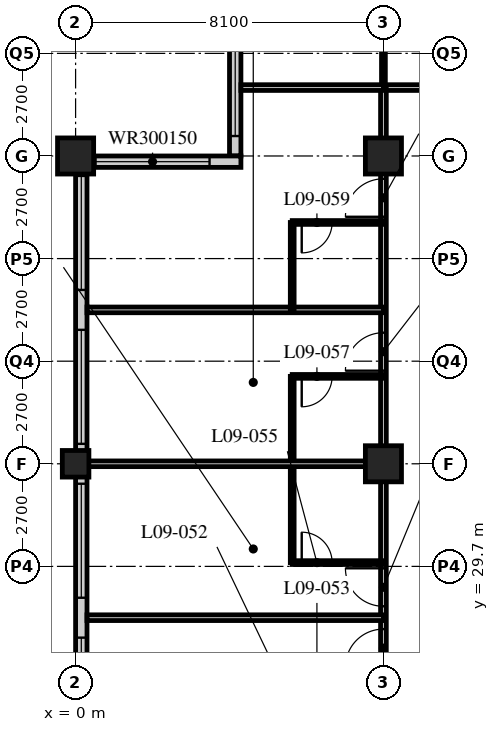
"""IFC4 building model, lengths in metres.
Left out: names, types, materials, properties, quantities, classifications, styles, units other than length and angle.
Written with IfcOpenShell. Run it as: python <this file> out.ifc"""

import sys

from ifc_helpers import new_model, si_unit, direction, frame, frame_2d, origin, origin_2d, place, context, subcontext, project, spatial, rectangle, hollow_rectangle, extrude, element, fill, save


model = new_model("IFC4")
c1 = context("Model", 3, precision=1e-05, world=origin(), true_north=direction((0.0, 1.0)))
c2 = subcontext(c1, "Body", "Model", "MODEL_VIEW")
j1 = project(units=[si_unit("LENGTHUNIT", "METRE"), si_unit("PLANEANGLEUNIT", "RADIAN")], contexts=[c1])
p1 = place(None, origin())
s1 = spatial("IfcSite", under=j1, at=p1, CompositionType="ELEMENT")
p2 = place(p1, origin())
s2 = spatial("IfcBuilding", under=s1, at=p2, CompositionType="ELEMENT")
p3 = place(p2, frame((0.0, 0.0, 43.2)))
s3 = spatial("IfcBuildingStorey", under=s2, at=p3, CompositionType="ELEMENT", Elevation=43.2)
p4 = place(p3, frame((0.0, 32.4, 0.0), z_axis=(0.0, 0.0, 1.0), x_axis=(1.0, 0.0, 0.0)))
e1 = element("IfcColumn", 1, at=p4, inside=s3, PredefinedType="COLUMN", context=c2, shape_type="SweptSolid", body=[
    extrude(hollow_rectangle(XDim=0.7, YDim=0.7, WallThickness=0.06, at=origin_2d()), origin(), (0.0, 0.0, 1.0), 3.4),
])
for number, where, z_axis, x_axis in (
    (2, (0.0, 40.5, 0.0), (0.0, 0.0, 1.0), (1.0, 0.0, 0.0)),
    (3, (8.1, 32.4, 0.0), (0.0, 0.0, 1.0), (1.0, 0.0, 0.0)),
    (4, (8.1, 40.5, 0.0), (0.0, 0.0, 1.0), (1.0, 0.0, 0.0)),
):
    element("IfcColumn", number, at=place(p3, frame(where, z_axis=z_axis, x_axis=x_axis)), inside=s3, PredefinedType="COLUMN", context=c2, shape_type="SweptSolid", body=[
        extrude(hollow_rectangle(XDim=0.95, YDim=0.95, WallThickness=0.095, at=origin_2d()), origin(), (0.0, 0.0, 1.0), 3.4),
    ])
p5 = place(p3, frame((4.2, 44.25, 0.0), z_axis=(0.0, 0.0, 1.0), x_axis=(0.0, -1.0, 0.0)))
e5 = element("IfcWall", 5, at=p5, inside=s3, PredefinedType="SOLIDWALL", context=c2, shape_type="SweptSolid", body=[
    extrude(rectangle(XDim=3.75, YDim=0.3, at=frame_2d((1.875, 0.0))), origin(), (0.0, 0.0, 1.0), 3.19),
])
p6 = place(p5, frame((0.225, 0.0, 0.9)))
e6 = element("IfcOpeningElement", 6, at=p6, cuts=e5, PredefinedType="OPENING", context=c2, shape_type="SweptSolid", body=[
    extrude(rectangle(XDim=3.0, YDim=1.5, at=frame_2d((1.5, 0.75))), frame((0.0, 0.16, 0.0), z_axis=(0.0, -1.0, 0.0), x_axis=(1.0, 0.0, 0.0)), (0.0, 0.0, 1.0), 0.32),
])
p7 = place(p3, frame((4.35, 40.35, 0.0), z_axis=(0.0, 0.0, 1.0), x_axis=(-1.0, 0.0, 0.0)))
e7 = element("IfcWall", 7, at=p7, inside=s3, PredefinedType="SOLIDWALL", context=c2, shape_type="SweptSolid", body=[
    extrude(rectangle(XDim=4.35, YDim=0.3, at=frame_2d((2.175, 0.0))), origin(), (0.0, 0.0, 1.0), 3.19),
])
p8 = place(p7, frame((0.825, 0.0, 0.9)))
e8 = element("IfcOpeningElement", 8, at=p8, cuts=e7, PredefinedType="OPENING", context=c2, shape_type="SweptSolid", body=[
    extrude(rectangle(XDim=3.0, YDim=1.5, at=frame_2d((1.5, 0.75))), frame((0.0, 0.16, 0.0), z_axis=(0.0, -1.0, 0.0), x_axis=(1.0, 0.0, 0.0)), (0.0, 0.0, 1.0), 0.32),
])
p9 = place(p3, frame((0.15, 40.2, 0.0), z_axis=(0.0, 0.0, 1.0), x_axis=(0.0, -1.0, 0.0)))
e9 = element("IfcWall", 9, at=p9, inside=s3, PredefinedType="SOLIDWALL", context=c2, shape_type="SweptSolid", body=[
    extrude(rectangle(XDim=32.1, YDim=0.3, at=frame_2d((16.05, 0.0))), origin(), (0.0, 0.0, 1.0), 3.19),
])
p10 = place(p9, frame((0.225, 0.0, 0.9)))
e10 = element("IfcOpeningElement", 10, at=p10, cuts=e9, PredefinedType="OPENING", context=c2, shape_type="SweptSolid", body=[
    extrude(rectangle(XDim=3.0, YDim=2.0, at=frame_2d((1.5, 1.0))), frame((0.0, 0.16, 0.0), z_axis=(0.0, -1.0, 0.0), x_axis=(1.0, 0.0, 0.0)), (0.0, 0.0, 1.0), 0.32),
])
p11 = place(p9, frame((4.275, 0.0, 0.9)))
e11 = element("IfcOpeningElement", 11, at=p11, cuts=e9, PredefinedType="OPENING", context=c2, shape_type="SweptSolid", body=[
    extrude(rectangle(XDim=3.0, YDim=2.0, at=frame_2d((1.5, 1.0))), frame((0.0, 0.16, 0.0), z_axis=(0.0, -1.0, 0.0), x_axis=(1.0, 0.0, 0.0)), (0.0, 0.0, 1.0), 0.32),
])
p12 = place(p9, frame((8.325, 0.0, 0.9)))
e12 = element("IfcOpeningElement", 12, at=p12, cuts=e9, PredefinedType="OPENING", context=c2, shape_type="SweptSolid", body=[
    extrude(rectangle(XDim=3.0, YDim=2.0, at=frame_2d((1.5, 1.0))), frame((0.0, 0.16, 0.0), z_axis=(0.0, -1.0, 0.0), x_axis=(1.0, 0.0, 0.0)), (0.0, 0.0, 1.0), 0.32),
])
p13 = place(p9, frame((12.375, 0.0, 0.9)))
e13 = element("IfcOpeningElement", 13, at=p13, cuts=e9, PredefinedType="OPENING", context=c2, shape_type="SweptSolid", body=[
    extrude(rectangle(XDim=3.0, YDim=2.0, at=frame_2d((1.5, 1.0))), frame((0.0, 0.16, 0.0), z_axis=(0.0, -1.0, 0.0), x_axis=(1.0, 0.0, 0.0)), (0.0, 0.0, 1.0), 0.32),
])
p14 = place(p9, frame((16.425, 0.0, 0.9)))
e14 = element("IfcOpeningElement", 14, at=p14, cuts=e9, PredefinedType="OPENING", context=c2, shape_type="SweptSolid", body=[
    extrude(rectangle(XDim=3.0, YDim=2.0, at=frame_2d((1.5, 1.0))), frame((0.0, 0.16, 0.0), z_axis=(0.0, -1.0, 0.0), x_axis=(1.0, 0.0, 0.0)), (0.0, 0.0, 1.0), 0.32),
])
p15 = place(p9, frame((20.475, 0.0, 0.9)))
e15 = element("IfcOpeningElement", 15, at=p15, cuts=e9, PredefinedType="OPENING", context=c2, shape_type="SweptSolid", body=[
    extrude(rectangle(XDim=3.0, YDim=2.0, at=frame_2d((1.5, 1.0))), frame((0.0, 0.16, 0.0), z_axis=(0.0, -1.0, 0.0), x_axis=(1.0, 0.0, 0.0)), (0.0, 0.0, 1.0), 0.32),
])
p16 = place(p9, frame((24.525, 0.0, 0.9)))
e16 = element("IfcOpeningElement", 16, at=p16, cuts=e9, PredefinedType="OPENING", context=c2, shape_type="SweptSolid", body=[
    extrude(rectangle(XDim=3.0, YDim=2.0, at=frame_2d((1.5, 1.0))), frame((0.0, 0.16, 0.0), z_axis=(0.0, -1.0, 0.0), x_axis=(1.0, 0.0, 0.0)), (0.0, 0.0, 1.0), 0.32),
])
p17 = place(p9, frame((28.575, 0.0, 0.9)))
e17 = element("IfcOpeningElement", 17, at=p17, cuts=e9, PredefinedType="OPENING", context=c2, shape_type="SweptSolid", body=[
    extrude(rectangle(XDim=3.0, YDim=2.0, at=frame_2d((1.5, 1.0))), frame((0.0, 0.16, 0.0), z_axis=(0.0, -1.0, 0.0), x_axis=(1.0, 0.0, 0.0)), (0.0, 0.0, 1.0), 0.32),
])
p18 = place(p3, frame((8.1, 42.3, 0.0), z_axis=(0.0, 0.0, 1.0), x_axis=(1.0, 0.0, 0.0)))
e18 = element("IfcWall", 18, at=p18, inside=s3, PredefinedType="PARTITIONING", context=c2, shape_type="SweptSolid", body=[
    extrude(rectangle(XDim=40.5, YDim=0.15, at=frame_2d((20.25, 0.0))), origin(), (0.0, 0.0, 1.0), 3.19),
])
p19 = place(p18, frame((6.5, 0.0, 0.0)))
e19 = element("IfcOpeningElement", 19, at=p19, cuts=e18, PredefinedType="OPENING", context=c2, shape_type="SweptSolid", body=[
    extrude(rectangle(XDim=1.0, YDim=2.1, at=frame_2d((0.5, 1.05))), frame((0.0, 0.085, 0.0), z_axis=(0.0, -1.0, 0.0), x_axis=(1.0, 0.0, 0.0)), (0.0, 0.0, 1.0), 0.17),
])
p20 = place(p18, frame((10.55, 0.0, 0.0)))
e20 = element("IfcOpeningElement", 20, at=p20, cuts=e18, PredefinedType="OPENING", context=c2, shape_type="SweptSolid", body=[
    extrude(rectangle(XDim=1.0, YDim=2.1, at=frame_2d((0.5, 1.05))), frame((0.0, 0.085, 0.0), z_axis=(0.0, -1.0, 0.0), x_axis=(1.0, 0.0, 0.0)), (0.0, 0.0, 1.0), 0.17),
])
p21 = place(p18, frame((14.6, 0.0, 0.0)))
e21 = element("IfcOpeningElement", 21, at=p21, cuts=e18, PredefinedType="OPENING", context=c2, shape_type="SweptSolid", body=[
    extrude(rectangle(XDim=1.0, YDim=2.1, at=frame_2d((0.5, 1.05))), frame((0.0, 0.085, 0.0), z_axis=(0.0, -1.0, 0.0), x_axis=(1.0, 0.0, 0.0)), (0.0, 0.0, 1.0), 0.17),
])
p22 = place(p18, frame((18.65, 0.0, 0.0)))
e22 = element("IfcOpeningElement", 22, at=p22, cuts=e18, PredefinedType="OPENING", context=c2, shape_type="SweptSolid", body=[
    extrude(rectangle(XDim=1.0, YDim=2.1, at=frame_2d((0.5, 1.05))), frame((0.0, 0.085, 0.0), z_axis=(0.0, -1.0, 0.0), x_axis=(1.0, 0.0, 0.0)), (0.0, 0.0, 1.0), 0.17),
])
p23 = place(p18, frame((22.7, 0.0, 0.0)))
e23 = element("IfcOpeningElement", 23, at=p23, cuts=e18, PredefinedType="OPENING", context=c2, shape_type="SweptSolid", body=[
    extrude(rectangle(XDim=1.0, YDim=2.1, at=frame_2d((0.5, 1.05))), frame((0.0, 0.085, 0.0), z_axis=(0.0, -1.0, 0.0), x_axis=(1.0, 0.0, 0.0)), (0.0, 0.0, 1.0), 0.17),
])
p24 = place(p18, frame((26.75, 0.0, 0.0)))
e24 = element("IfcOpeningElement", 24, at=p24, cuts=e18, PredefinedType="OPENING", context=c2, shape_type="SweptSolid", body=[
    extrude(rectangle(XDim=1.0, YDim=2.1, at=frame_2d((0.5, 1.05))), frame((0.0, 0.085, 0.0), z_axis=(0.0, -1.0, 0.0), x_axis=(1.0, 0.0, 0.0)), (0.0, 0.0, 1.0), 0.17),
])
p25 = place(p18, frame((30.8, 0.0, 0.0)))
e25 = element("IfcOpeningElement", 25, at=p25, cuts=e18, PredefinedType="OPENING", context=c2, shape_type="SweptSolid", body=[
    extrude(rectangle(XDim=1.0, YDim=2.1, at=frame_2d((0.5, 1.05))), frame((0.0, 0.085, 0.0), z_axis=(0.0, -1.0, 0.0), x_axis=(1.0, 0.0, 0.0)), (0.0, 0.0, 1.0), 0.17),
])
p26 = place(p18, frame((34.85, 0.0, 0.0)))
e26 = element("IfcOpeningElement", 26, at=p26, cuts=e18, PredefinedType="OPENING", context=c2, shape_type="SweptSolid", body=[
    extrude(rectangle(XDim=1.0, YDim=2.1, at=frame_2d((0.5, 1.05))), frame((0.0, 0.085, 0.0), z_axis=(0.0, -1.0, 0.0), x_axis=(1.0, 0.0, 0.0)), (0.0, 0.0, 1.0), 0.17),
])
p27 = place(p18, frame((36.875, 0.0, 0.0)))
e27 = element("IfcOpeningElement", 27, at=p27, cuts=e18, PredefinedType="OPENING", context=c2, shape_type="SweptSolid", body=[
    extrude(rectangle(XDim=1.0, YDim=2.1, at=frame_2d((0.5, 1.05))), frame((0.0, 0.085, 0.0), z_axis=(0.0, -1.0, 0.0), x_axis=(1.0, 0.0, 0.0)), (0.0, 0.0, 1.0), 0.17),
])
p28 = place(p18, frame((2.625, 0.0, 0.0)))
e28 = element("IfcOpeningElement", 28, at=p28, cuts=e18, PredefinedType="OPENING", context=c2, shape_type="SweptSolid", body=[
    extrude(rectangle(XDim=1.0, YDim=2.1, at=frame_2d((0.5, 1.05))), frame((0.0, 0.085, 0.0), z_axis=(0.0, -1.0, 0.0), x_axis=(1.0, 0.0, 0.0)), (0.0, 0.0, 1.0), 0.17),
])
p29 = place(p3, frame((8.1, 16.2, 0.0), z_axis=(0.0, 0.0, 1.0), x_axis=(0.0, 1.0, 0.0)))
e29 = element("IfcWall", 29, at=p29, inside=s3, PredefinedType="PARTITIONING", context=c2, shape_type="SweptSolid", body=[
    extrude(rectangle(XDim=26.1, YDim=0.15, at=frame_2d((13.05, 0.0))), origin(), (0.0, 0.0, 1.0), 2.578),
])
p30 = place(p29, frame((2.75, 0.0, 0.0)))
e30 = element("IfcOpeningElement", 30, at=p30, cuts=e29, PredefinedType="OPENING", context=c2, shape_type="SweptSolid", body=[
    extrude(rectangle(XDim=1.0, YDim=2.1, at=frame_2d((0.5, 1.05))), frame((0.0, 0.085, 0.0), z_axis=(0.0, -1.0, 0.0), x_axis=(1.0, 0.0, 0.0)), (0.0, 0.0, 1.0), 0.17),
])
p31 = place(p29, frame((4.35, 0.0, 0.0)))
e31 = element("IfcOpeningElement", 31, at=p31, cuts=e29, PredefinedType="OPENING", context=c2, shape_type="SweptSolid", body=[
    extrude(rectangle(XDim=1.0, YDim=2.1, at=frame_2d((0.5, 1.05))), frame((0.0, 0.085, 0.0), z_axis=(0.0, -1.0, 0.0), x_axis=(1.0, 0.0, 0.0)), (0.0, 0.0, 1.0), 0.17),
])
p32 = place(p29, frame((10.85, 0.0, 0.0)))
e32 = element("IfcOpeningElement", 32, at=p32, cuts=e29, PredefinedType="OPENING", context=c2, shape_type="SweptSolid", body=[
    extrude(rectangle(XDim=1.0, YDim=2.1, at=frame_2d((0.5, 1.05))), frame((0.0, 0.085, 0.0), z_axis=(0.0, -1.0, 0.0), x_axis=(1.0, 0.0, 0.0)), (0.0, 0.0, 1.0), 0.17),
])
p33 = place(p29, frame((12.45, 0.0, 0.0)))
e33 = element("IfcOpeningElement", 33, at=p33, cuts=e29, PredefinedType="OPENING", context=c2, shape_type="SweptSolid", body=[
    extrude(rectangle(XDim=1.0, YDim=2.1, at=frame_2d((0.5, 1.05))), frame((0.0, 0.085, 0.0), z_axis=(0.0, -1.0, 0.0), x_axis=(1.0, 0.0, 0.0)), (0.0, 0.0, 1.0), 0.17),
])
p34 = place(p29, frame((18.65, 0.0, 0.0)))
e34 = element("IfcOpeningElement", 34, at=p34, cuts=e29, PredefinedType="OPENING", context=c2, shape_type="SweptSolid", body=[
    extrude(rectangle(XDim=1.0, YDim=2.1, at=frame_2d((0.5, 1.05))), frame((0.0, 0.085, 0.0), z_axis=(0.0, -1.0, 0.0), x_axis=(1.0, 0.0, 0.0)), (0.0, 0.0, 1.0), 0.17),
])
p35 = place(p29, frame((22.7, 0.0, 0.0)))
e35 = element("IfcOpeningElement", 35, at=p35, cuts=e29, PredefinedType="OPENING", context=c2, shape_type="SweptSolid", body=[
    extrude(rectangle(XDim=1.0, YDim=2.1, at=frame_2d((0.5, 1.05))), frame((0.0, 0.085, 0.0), z_axis=(0.0, -1.0, 0.0), x_axis=(1.0, 0.0, 0.0)), (0.0, 0.0, 1.0), 0.17),
])
p36 = place(p3, frame((8.1, 28.35, 0.0), z_axis=(0.0, 0.0, 1.0), x_axis=(-1.0, 0.0, 0.0)))
e36 = element("IfcWall", 36, at=p36, inside=s3, PredefinedType="PARTITIONING", context=c2, shape_type="SweptSolid", body=[
    extrude(rectangle(XDim=7.8, YDim=0.15, at=frame_2d((3.9, 0.0))), origin(), (0.0, 0.0, 1.0), 3.19),
])
p37 = place(p3, frame((5.7, 29.8, 0.0), z_axis=(0.0, 0.0, 1.0), x_axis=(0.0, 1.0, 0.0)))
e37 = element("IfcWall", 37, at=p37, inside=s3, PredefinedType="PARTITIONING", context=c2, shape_type="SweptSolid", body=[
    extrude(rectangle(XDim=4.9, YDim=0.1, at=frame_2d((2.45, 0.0))), origin(), (0.0, 0.0, 1.0), 3.19),
])
p38 = place(p3, frame((8.1, 29.8, 0.0), z_axis=(0.0, 0.0, 1.0), x_axis=(-1.0, 0.0, 0.0)))
e38 = element("IfcWall", 38, at=p38, inside=s3, PredefinedType="PARTITIONING", context=c2, shape_type="SweptSolid", body=[
    extrude(rectangle(XDim=2.4, YDim=0.1, at=frame_2d((1.2, 0.0))), origin(), (0.0, 0.0, 1.0), 3.19),
])
p39 = place(p38, frame((1.35, 0.0, 0.0)))
e39 = element("IfcOpeningElement", 39, at=p39, cuts=e38, PredefinedType="OPENING", context=c2, shape_type="SweptSolid", body=[
    extrude(rectangle(XDim=0.8, YDim=2.1, at=frame_2d((0.4, 1.05))), frame((0.0, 0.06, 0.0), z_axis=(0.0, -1.0, 0.0), x_axis=(1.0, 0.0, 0.0)), (0.0, 0.0, 1.0), 0.12),
])
p40 = place(p3, frame((8.1, 32.4, 0.0), z_axis=(0.0, 0.0, 1.0), x_axis=(-1.0, 0.0, 0.0)))
e40 = element("IfcWall", 40, at=p40, inside=s3, PredefinedType="PARTITIONING", context=c2, shape_type="SweptSolid", body=[
    extrude(rectangle(XDim=7.8, YDim=0.15, at=frame_2d((3.9, 0.0))), origin(), (0.0, 0.0, 1.0), 2.578),
])
p41 = place(p3, frame((8.1, 34.7, 0.0), z_axis=(0.0, 0.0, 1.0), x_axis=(-1.0, 0.0, 0.0)))
e41 = element("IfcWall", 41, at=p41, inside=s3, PredefinedType="PARTITIONING", context=c2, shape_type="SweptSolid", body=[
    extrude(rectangle(XDim=2.4, YDim=0.1, at=frame_2d((1.2, 0.0))), origin(), (0.0, 0.0, 1.0), 3.19),
])
p42 = place(p41, frame((1.35, 0.0, 0.0)))
e42 = element("IfcOpeningElement", 42, at=p42, cuts=e41, PredefinedType="OPENING", context=c2, shape_type="SweptSolid", body=[
    extrude(rectangle(XDim=0.8, YDim=2.1, at=frame_2d((0.4, 1.05))), frame((0.0, 0.06, 0.0), z_axis=(0.0, -1.0, 0.0), x_axis=(1.0, 0.0, 0.0)), (0.0, 0.0, 1.0), 0.12),
])
p43 = place(p3, frame((8.1, 36.45, 0.0), z_axis=(0.0, 0.0, 1.0), x_axis=(-1.0, 0.0, 0.0)))
e43 = element("IfcWall", 43, at=p43, inside=s3, PredefinedType="PARTITIONING", context=c2, shape_type="SweptSolid", body=[
    extrude(rectangle(XDim=7.8, YDim=0.15, at=frame_2d((3.9, 0.0))), origin(), (0.0, 0.0, 1.0), 3.19),
])
p44 = place(p3, frame((5.7, 36.45, 0.0), z_axis=(0.0, 0.0, 1.0), x_axis=(0.0, 1.0, 0.0)))
e44 = element("IfcWall", 44, at=p44, inside=s3, PredefinedType="PARTITIONING", context=c2, shape_type="SweptSolid", body=[
    extrude(rectangle(XDim=2.3, YDim=0.1, at=frame_2d((1.15, 0.0))), origin(), (0.0, 0.0, 1.0), 3.19),
])
p45 = place(p3, frame((8.1, 38.75, 0.0), z_axis=(0.0, 0.0, 1.0), x_axis=(-1.0, 0.0, 0.0)))
e45 = element("IfcWall", 45, at=p45, inside=s3, PredefinedType="PARTITIONING", context=c2, shape_type="SweptSolid", body=[
    extrude(rectangle(XDim=2.4, YDim=0.1, at=frame_2d((1.2, 0.0))), origin(), (0.0, 0.0, 1.0), 3.19),
])
p46 = place(p45, frame((1.35, 0.0, 0.0)))
e46 = element("IfcOpeningElement", 46, at=p46, cuts=e45, PredefinedType="OPENING", context=c2, shape_type="SweptSolid", body=[
    extrude(rectangle(XDim=0.8, YDim=2.1, at=frame_2d((0.4, 1.05))), frame((0.0, 0.06, 0.0), z_axis=(0.0, -1.0, 0.0), x_axis=(1.0, 0.0, 0.0)), (0.0, 0.0, 1.0), 0.12),
])
p47 = place(p3, frame((8.1, 42.3, 0.0), z_axis=(0.0, 0.0, 1.0), x_axis=(0.0, 1.0, 0.0)))
e47 = element("IfcWall", 47, at=p47, inside=s3, PredefinedType="PARTITIONING", context=c2, shape_type="SweptSolid", body=[
    extrude(rectangle(XDim=2.25, YDim=0.1, at=frame_2d((1.125, 0.0))), origin(), (0.0, 0.0, 1.0), 2.578),
])
p48 = place(p3, frame((4.35, 42.3, 0.0), z_axis=(0.0, 0.0, 1.0), x_axis=(1.0, 0.0, 0.0)))
e48 = element("IfcWall", 48, at=p48, inside=s3, PredefinedType="PARTITIONING", context=c2, shape_type="SweptSolid", body=[
    extrude(rectangle(XDim=3.75, YDim=0.15, at=frame_2d((1.875, 0.0))), origin(), (0.0, 0.0, 1.0), 3.19),
])
p49 = place(p6, origin())
e49 = element("IfcWindow", 49, at=p49, inside=s3, PartitioningType="SINGLE_PANEL", PredefinedType="WINDOW", context=c2, shape_type="SweptSolid", body=[
    extrude(rectangle(XDim=3.0, YDim=1.5, at=frame_2d((1.5, 0.75))), frame((0.0, 0.03, 0.0), z_axis=(0.0, -1.0, 0.0), x_axis=(1.0, 0.0, 0.0)), (0.0, 0.0, 1.0), 0.06),
])
fill(e6, e49)
p50 = place(p8, origin())
e50 = element("IfcWindow", 50, at=p50, inside=s3, PartitioningType="SINGLE_PANEL", PredefinedType="WINDOW", context=c2, shape_type="SweptSolid", body=[
    extrude(rectangle(XDim=3.0, YDim=1.5, at=frame_2d((1.5, 0.75))), frame((0.0, 0.03, 0.0), z_axis=(0.0, -1.0, 0.0), x_axis=(1.0, 0.0, 0.0)), (0.0, 0.0, 1.0), 0.06),
])
fill(e8, e50)
p51 = place(p10, origin())
e51 = element("IfcWindow", 51, at=p51, inside=s3, PartitioningType="SINGLE_PANEL", PredefinedType="WINDOW", context=c2, shape_type="SweptSolid", body=[
    extrude(rectangle(XDim=3.0, YDim=2.0, at=frame_2d((1.5, 1.0))), frame((0.0, 0.03, 0.0), z_axis=(0.0, -1.0, 0.0), x_axis=(1.0, 0.0, 0.0)), (0.0, 0.0, 1.0), 0.06),
])
fill(e10, e51)
p52 = place(p11, origin())
e52 = element("IfcWindow", 52, at=p52, inside=s3, PartitioningType="SINGLE_PANEL", PredefinedType="WINDOW", context=c2, shape_type="SweptSolid", body=[
    extrude(rectangle(XDim=3.0, YDim=2.0, at=frame_2d((1.5, 1.0))), frame((0.0, 0.03, 0.0), z_axis=(0.0, -1.0, 0.0), x_axis=(1.0, 0.0, 0.0)), (0.0, 0.0, 1.0), 0.06),
])
fill(e11, e52)
p53 = place(p12, origin())
e53 = element("IfcWindow", 53, at=p53, inside=s3, PartitioningType="SINGLE_PANEL", PredefinedType="WINDOW", context=c2, shape_type="SweptSolid", body=[
    extrude(rectangle(XDim=3.0, YDim=2.0, at=frame_2d((1.5, 1.0))), frame((0.0, 0.03, 0.0), z_axis=(0.0, -1.0, 0.0), x_axis=(1.0, 0.0, 0.0)), (0.0, 0.0, 1.0), 0.06),
])
fill(e12, e53)
p54 = place(p13, origin())
e54 = element("IfcWindow", 54, at=p54, inside=s3, PartitioningType="SINGLE_PANEL", PredefinedType="WINDOW", context=c2, shape_type="SweptSolid", body=[
    extrude(rectangle(XDim=3.0, YDim=2.0, at=frame_2d((1.5, 1.0))), frame((0.0, 0.03, 0.0), z_axis=(0.0, -1.0, 0.0), x_axis=(1.0, 0.0, 0.0)), (0.0, 0.0, 1.0), 0.06),
])
fill(e13, e54)
p55 = place(p32, origin())
e55 = element("IfcDoor", 55, at=p55, inside=s3, OperationType="SINGLE_SWING_LEFT", PredefinedType="DOOR", context=c2, shape_type="SweptSolid", body=[
    extrude(rectangle(XDim=1.0, YDim=2.1, at=frame_2d((0.5, 1.05))), frame((0.0, 0.025, 0.0), z_axis=(0.0, -1.0, 0.0), x_axis=(1.0, 0.0, 0.0)), (0.0, 0.0, 1.0), 0.05),
])
fill(e32, e55)
p56 = place(p39, origin())
e56 = element("IfcDoor", 56, at=p56, inside=s3, OperationType="SINGLE_SWING_LEFT", PredefinedType="DOOR", context=c2, shape_type="SweptSolid", body=[
    extrude(rectangle(XDim=0.8, YDim=2.1, at=frame_2d((0.4, 1.05))), frame((0.0, 0.025, 0.0), z_axis=(0.0, -1.0, 0.0), x_axis=(1.0, 0.0, 0.0)), (0.0, 0.0, 1.0), 0.05),
])
fill(e39, e56)
p57 = place(p33, origin())
e57 = element("IfcDoor", 57, at=p57, inside=s3, OperationType="SINGLE_SWING_RIGHT", PredefinedType="DOOR", context=c2, shape_type="SweptSolid", body=[
    extrude(rectangle(XDim=1.0, YDim=2.1, at=frame_2d((0.5, 1.05))), frame((0.0, 0.025, 0.0), z_axis=(0.0, -1.0, 0.0), x_axis=(1.0, 0.0, 0.0)), (0.0, 0.0, 1.0), 0.05),
])
fill(e33, e57)
p58 = place(p42, origin())
e58 = element("IfcDoor", 58, at=p58, inside=s3, OperationType="SINGLE_SWING_RIGHT", PredefinedType="DOOR", context=c2, shape_type="SweptSolid", body=[
    extrude(rectangle(XDim=0.8, YDim=2.1, at=frame_2d((0.4, 1.05))), frame((0.0, 0.025, 0.0), z_axis=(0.0, -1.0, 0.0), x_axis=(1.0, 0.0, 0.0)), (0.0, 0.0, 1.0), 0.05),
])
fill(e42, e58)
p59 = place(p34, origin())
e59 = element("IfcDoor", 59, at=p59, inside=s3, OperationType="SINGLE_SWING_LEFT", PredefinedType="DOOR", context=c2, shape_type="SweptSolid", body=[
    extrude(rectangle(XDim=1.0, YDim=2.1, at=frame_2d((0.5, 1.05))), frame((0.0, 0.025, 0.0), z_axis=(0.0, -1.0, 0.0), x_axis=(1.0, 0.0, 0.0)), (0.0, 0.0, 1.0), 0.05),
])
fill(e34, e59)
p60 = place(p46, origin())
e60 = element("IfcDoor", 60, at=p60, inside=s3, OperationType="SINGLE_SWING_RIGHT", PredefinedType="DOOR", context=c2, shape_type="SweptSolid", body=[
    extrude(rectangle(XDim=0.8, YDim=2.1, at=frame_2d((0.4, 1.05))), frame((0.0, 0.025, 0.0), z_axis=(0.0, -1.0, 0.0), x_axis=(1.0, 0.0, 0.0)), (0.0, 0.0, 1.0), 0.05),
])
fill(e46, e60)
p61 = place(p35, origin())
e61 = element("IfcDoor", 61, at=p61, inside=s3, OperationType="SINGLE_SWING_LEFT", PredefinedType="DOOR", context=c2, shape_type="SweptSolid", body=[
    extrude(rectangle(XDim=1.0, YDim=2.1, at=frame_2d((0.5, 1.05))), frame((0.0, 0.025, 0.0), z_axis=(0.0, -1.0, 0.0), x_axis=(1.0, 0.0, 0.0)), (0.0, 0.0, 1.0), 0.05),
])
fill(e35, e61)
save(model, sys.argv[1])
